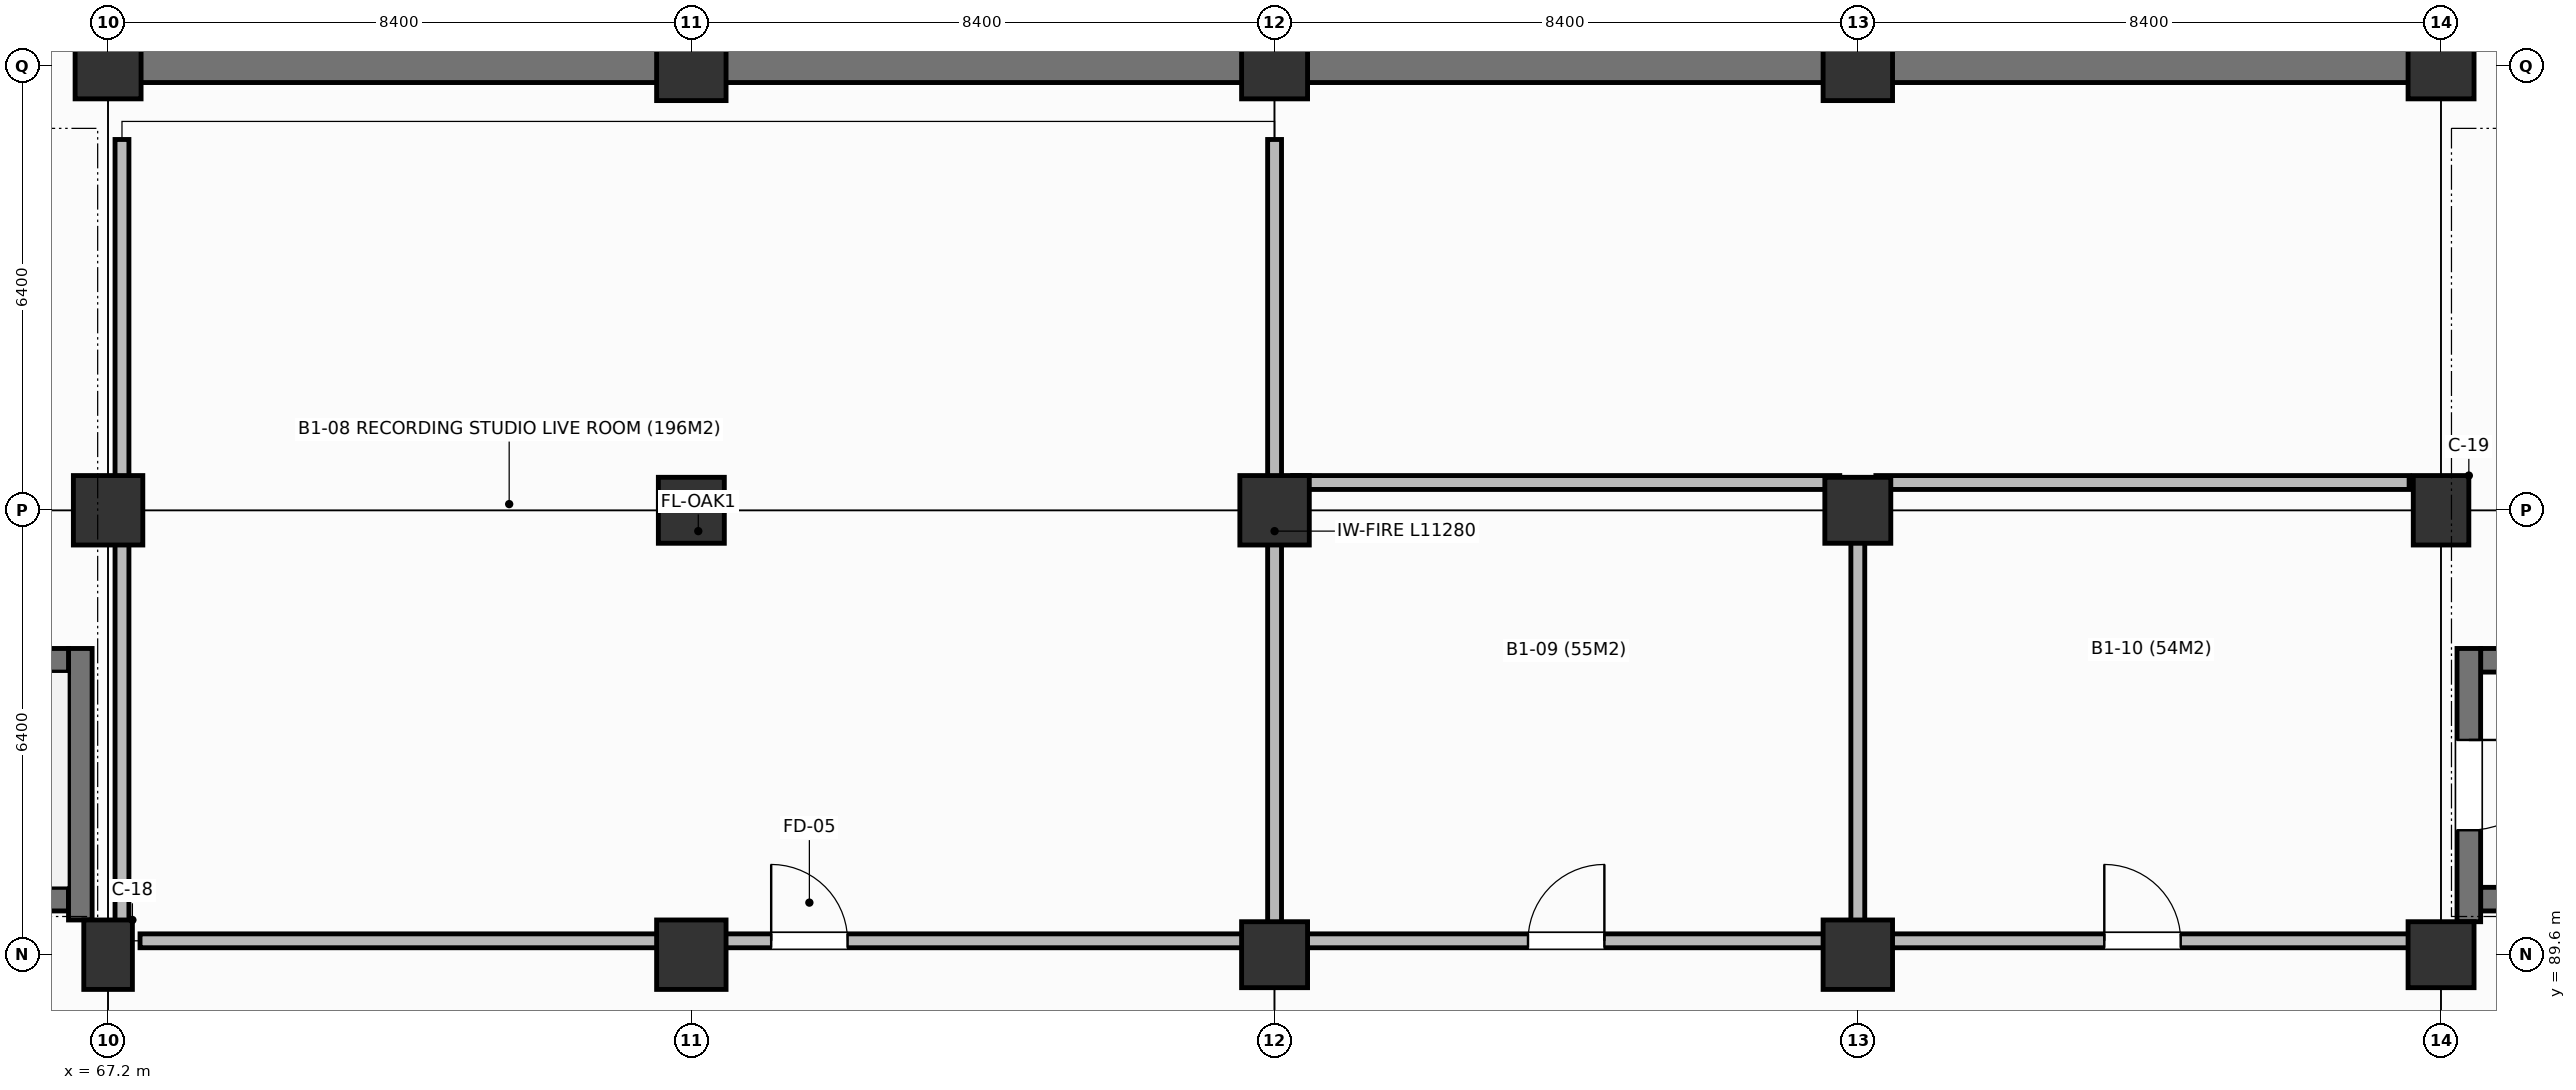
"""IFC4 building model, lengths in metres.
Left out: names, types, materials, properties, quantities, classifications, styles, units other than length and angle.
Written with IfcOpenShell. Run it as: python <this file> out.ifc"""

import sys

from ifc_helpers import new_model, si_unit, direction, frame, frame_2d, origin, origin_2d, place, context, subcontext, project, spatial, rectangle, extrude, element, fill, save


model = new_model("IFC4")
c1 = context("Model", 3, precision=1e-05, world=origin(), true_north=direction((0.0, 1.0)))
c2 = subcontext(c1, "Body", "Model", "MODEL_VIEW")
j1 = project(units=[si_unit("LENGTHUNIT", "METRE"), si_unit("PLANEANGLEUNIT", "RADIAN")], contexts=[c1])
p1 = place(None, origin())
s1 = spatial("IfcSite", under=j1, at=p1, CompositionType="ELEMENT")
p2 = place(p1, origin())
s2 = spatial("IfcBuilding", under=s1, at=p2, CompositionType="ELEMENT")
p3 = place(p2, frame((0.0, 0.0, -4.8)))
s3 = spatial("IfcBuildingStorey", under=s2, at=p3, CompositionType="ELEMENT", Elevation=-4.8)
p4 = place(p3, frame((67.2, 89.6, 0.0), z_axis=(0.0, 0.0, 1.0), x_axis=(1.0, 0.0, 0.0)))
e1 = element("IfcColumn", 1, at=p4, inside=s3, PredefinedType="COLUMN", context=c2, shape_type="SweptSolid", body=[
    extrude(rectangle(XDim=0.7, YDim=1.0, at=origin_2d()), origin(), (0.0, 0.0, 1.0), 4.8),
])
p5 = place(p3, frame((67.2, 96.0, 0.0), z_axis=(0.0, 0.0, 1.0), x_axis=(1.0, 0.0, 0.0)))
e2 = element("IfcColumn", 2, at=p5, inside=s3, PredefinedType="COLUMN", context=c2, shape_type="SweptSolid", body=[
    extrude(rectangle(XDim=1.0, YDim=1.0, at=origin_2d()), origin(), (0.0, 0.0, 1.0), 4.8),
])
p6 = place(p3, frame((67.2, 102.4, 0.0), z_axis=(0.0, 0.0, 1.0), x_axis=(1.0, 0.0, 0.0)))
e3 = element("IfcColumn", 3, at=p6, inside=s3, PredefinedType="COLUMN", context=c2, shape_type="SweptSolid", body=[
    extrude(rectangle(XDim=0.95, YDim=0.95, at=origin_2d()), origin(), (0.0, 0.0, 1.0), 4.8),
])
p7 = place(p3, frame((75.6, 89.6, 0.0), z_axis=(0.0, 0.0, 1.0), x_axis=(1.0, 0.0, 0.0)))
e4 = element("IfcColumn", 4, at=p7, inside=s3, PredefinedType="COLUMN", context=c2, shape_type="SweptSolid", body=[
    extrude(rectangle(XDim=1.0, YDim=1.0, at=origin_2d()), origin(), (0.0, 0.0, 1.0), 4.8),
])
p8 = place(p3, frame((75.6, 96.0, 0.0), z_axis=(0.0, 0.0, 1.0), x_axis=(1.0, 0.0, 0.0)))
e5 = element("IfcColumn", 5, at=p8, inside=s3, PredefinedType="COLUMN", context=c2, shape_type="SweptSolid", body=[
    extrude(rectangle(XDim=0.95, YDim=0.95, at=origin_2d()), origin(), (0.0, 0.0, 1.0), 4.8),
])
p9 = place(p3, frame((75.6, 102.4, 0.0), z_axis=(0.0, 0.0, 1.0), x_axis=(1.0, 0.0, 0.0)))
e6 = element("IfcColumn", 6, at=p9, inside=s3, PredefinedType="COLUMN", context=c2, shape_type="SweptSolid", body=[
    extrude(rectangle(XDim=1.0, YDim=1.0, at=origin_2d()), origin(), (0.0, 0.0, 1.0), 4.8),
])
p10 = place(p3, frame((84.0, 89.6, 0.0), z_axis=(0.0, 0.0, 1.0), x_axis=(1.0, 0.0, 0.0)))
e7 = element("IfcColumn", 7, at=p10, inside=s3, PredefinedType="COLUMN", context=c2, shape_type="SweptSolid", body=[
    extrude(rectangle(XDim=0.95, YDim=0.95, at=origin_2d()), origin(), (0.0, 0.0, 1.0), 4.8),
])
p11 = place(p3, frame((84.0, 96.0, 0.0), z_axis=(0.0, 0.0, 1.0), x_axis=(1.0, 0.0, 0.0)))
e8 = element("IfcColumn", 8, at=p11, inside=s3, PredefinedType="COLUMN", context=c2, shape_type="SweptSolid", body=[
    extrude(rectangle(XDim=1.0, YDim=1.0, at=origin_2d()), origin(), (0.0, 0.0, 1.0), 4.8),
])
p12 = place(p3, frame((84.0, 102.4, 0.0), z_axis=(0.0, 0.0, 1.0), x_axis=(1.0, 0.0, 0.0)))
e9 = element("IfcColumn", 9, at=p12, inside=s3, PredefinedType="COLUMN", context=c2, shape_type="SweptSolid", body=[
    extrude(rectangle(XDim=0.95, YDim=0.95, at=origin_2d()), origin(), (0.0, 0.0, 1.0), 4.8),
])
p13 = place(p3, frame((92.4, 89.6, 0.0), z_axis=(0.0, 0.0, 1.0), x_axis=(1.0, 0.0, 0.0)))
e10 = element("IfcColumn", 10, at=p13, inside=s3, PredefinedType="COLUMN", context=c2, shape_type="SweptSolid", body=[
    extrude(rectangle(XDim=1.0, YDim=1.0, at=origin_2d()), origin(), (0.0, 0.0, 1.0), 4.8),
])
p14 = place(p3, frame((92.4, 96.0, 0.0), z_axis=(0.0, 0.0, 1.0), x_axis=(1.0, 0.0, 0.0)))
e11 = element("IfcColumn", 11, at=p14, inside=s3, PredefinedType="COLUMN", context=c2, shape_type="SweptSolid", body=[
    extrude(rectangle(XDim=0.95, YDim=0.95, at=origin_2d()), origin(), (0.0, 0.0, 1.0), 4.8),
])
p15 = place(p3, frame((92.4, 102.4, 0.0), z_axis=(0.0, 0.0, 1.0), x_axis=(1.0, 0.0, 0.0)))
e12 = element("IfcColumn", 12, at=p15, inside=s3, PredefinedType="COLUMN", context=c2, shape_type="SweptSolid", body=[
    extrude(rectangle(XDim=1.0, YDim=1.0, at=origin_2d()), origin(), (0.0, 0.0, 1.0), 4.8),
])
p16 = place(p3, frame((100.8, 89.6, 0.0), z_axis=(0.0, 0.0, 1.0), x_axis=(1.0, 0.0, 0.0)))
e13 = element("IfcColumn", 13, at=p16, inside=s3, PredefinedType="COLUMN", context=c2, shape_type="SweptSolid", body=[
    extrude(rectangle(XDim=0.95, YDim=0.95, at=origin_2d()), origin(), (0.0, 0.0, 1.0), 4.8),
])
p17 = place(p3, frame((100.8, 96.0, 0.0), z_axis=(0.0, 0.0, 1.0), x_axis=(1.0, 0.0, 0.0)))
e14 = element("IfcColumn", 14, at=p17, inside=s3, PredefinedType="COLUMN", context=c2, shape_type="SweptSolid", body=[
    extrude(rectangle(XDim=0.8, YDim=1.0, at=origin_2d()), origin(), (0.0, 0.0, 1.0), 4.8),
])
p18 = place(p3, frame((100.8, 102.4, 0.0), z_axis=(0.0, 0.0, 1.0), x_axis=(1.0, 0.0, 0.0)))
e15 = element("IfcColumn", 15, at=p18, inside=s3, PredefinedType="COLUMN", context=c2, shape_type="SweptSolid", body=[
    extrude(rectangle(XDim=0.95, YDim=0.95, at=origin_2d()), origin(), (0.0, 0.0, 1.0), 4.8),
])
p19 = place(p3, frame((67.2, 108.8, 0.0), z_axis=(0.0, 0.0, 1.0), x_axis=(0.0, -1.0, 0.0)))
e16 = element("IfcWall", 16, at=p19, inside=s3, PredefinedType="SOLIDWALL", context=c2, shape_type="SweptSolid", body=[
    extrude(rectangle(XDim=6.4, YDim=0.48, at=frame_2d((3.2, 0.0))), origin(), (0.0, 0.0, 1.0), 4.25),
])
p20 = place(p3, frame((67.2, 102.4, 0.0), z_axis=(0.0, 0.0, 1.0), x_axis=(1.0, 0.0, 0.0)))
e17 = element("IfcWall", 17, at=p20, inside=s3, PredefinedType="SOLIDWALL", context=c2, shape_type="SweptSolid", body=[
    extrude(rectangle(XDim=8.4, YDim=0.48, at=frame_2d((4.2, 0.0))), origin(), (0.0, 0.0, 1.0), 4.25),
])
for number, where, z_axis, x_axis in (
    (18, (75.6, 102.4, 0.0), (0.0, 0.0, 1.0), (1.0, 0.0, 0.0)),
    (19, (84.0, 102.4, 0.0), (0.0, 0.0, 1.0), (1.0, 0.0, 0.0)),
):
    element("IfcWall", number, at=place(p3, frame(where, z_axis=z_axis, x_axis=x_axis)), inside=s3, PredefinedType="SOLIDWALL", context=c2, shape_type="SweptSolid", body=[
        extrude(rectangle(XDim=8.4, YDim=0.48, at=frame_2d((4.2, 0.0))), origin(), (0.0, 0.0, 1.0), 4.25),
    ])
p21 = place(p3, frame((92.4, 102.4, 0.0), z_axis=(0.0, 0.0, 1.0), x_axis=(1.0, 0.0, 0.0)))
e20 = element("IfcWall", 20, at=p21, inside=s3, PredefinedType="SOLIDWALL", context=c2, shape_type="SweptSolid", body=[
    extrude(rectangle(XDim=8.4, YDim=0.48, at=frame_2d((4.2, 0.0))), origin(), (0.0, 0.0, 1.0), 4.25),
])
p22 = place(p3, frame((100.8, 102.4, 0.0), z_axis=(0.0, 0.0, 1.0), x_axis=(0.0, 1.0, 0.0)))
e21 = element("IfcWall", 21, at=p22, inside=s3, PredefinedType="SOLIDWALL", context=c2, shape_type="SweptSolid", body=[
    extrude(rectangle(XDim=6.4, YDim=0.48, at=frame_2d((3.2, 0.0))), origin(), (0.0, 0.0, 1.0), 4.25),
])
p23 = place(p3, frame((59.37, 90.4, 0.0), z_axis=(0.0, 0.0, 1.0), x_axis=(1.0, 0.0, 0.0)))
e22 = element("IfcWall", 22, at=p23, inside=s3, PredefinedType="SHEAR", context=c2, shape_type="SweptSolid", body=[
    extrude(rectangle(XDim=7.26, YDim=0.34, at=frame_2d((3.63, 0.0))), origin(), (0.0, 0.0, 1.0), 4.8),
])
p24 = place(p3, frame((66.8, 90.1, 0.0), z_axis=(0.0, 0.0, 1.0), x_axis=(0.0, 1.0, 0.0)))
e23 = element("IfcWall", 23, at=p24, inside=s3, PredefinedType="SHEAR", context=c2, shape_type="SweptSolid", body=[
    extrude(rectangle(XDim=3.91, YDim=0.34, at=frame_2d((1.955, 0.0))), origin(), (0.0, 0.0, 1.0), 4.8),
])
for number, where, z_axis, x_axis in (
    (24, (66.63, 93.84, 0.0), (0.0, 0.0, 1.0), (-1.0, 0.0, 0.0)),
    (25, (101.37, 90.4, 0.0), (0.0, 0.0, 1.0), (1.0, 0.0, 0.0)),
    (26, (108.63, 93.84, 0.0), (0.0, 0.0, 1.0), (-1.0, 0.0, 0.0)),
):
    element("IfcWall", number, at=place(p3, frame(where, z_axis=z_axis, x_axis=x_axis)), inside=s3, PredefinedType="SHEAR", context=c2, shape_type="SweptSolid", body=[
        extrude(rectangle(XDim=7.26, YDim=0.34, at=frame_2d((3.63, 0.0))), origin(), (0.0, 0.0, 1.0), 4.8),
    ])
p25 = place(p3, frame((101.2, 94.01, 0.0), z_axis=(0.0, 0.0, 1.0), x_axis=(0.0, -1.0, 0.0)))
e27 = element("IfcWall", 27, at=p25, inside=s3, PredefinedType="SHEAR", context=c2, shape_type="SweptSolid", body=[
    extrude(rectangle(XDim=3.935, YDim=0.34, at=frame_2d((1.968, 0.0))), origin(), (0.0, 0.0, 1.0), 4.8),
])
p26 = place(p25, frame((1.317, 0.0, 0.0)))
e28 = element("IfcOpeningElement", 28, at=p26, cuts=e27, PredefinedType="OPENING", context=c2, shape_type="SweptSolid", body=[
    extrude(rectangle(XDim=1.3, YDim=2.15, at=frame_2d((0.65, 1.075))), frame((0.0, 0.18, 0.0), z_axis=(0.0, -1.0, 0.0), x_axis=(1.0, 0.0, 0.0)), (0.0, 0.0, 1.0), 0.36),
])
p27 = place(p3, frame((67.66, 89.8, 0.0), z_axis=(0.0, 0.0, 1.0), x_axis=(1.0, 0.0, 0.0)))
e29 = element("IfcWall", 29, at=p27, inside=s3, PredefinedType="PARTITIONING", context=c2, shape_type="SweptSolid", body=[
    extrude(rectangle(XDim=16.08, YDim=0.2, at=frame_2d((8.04, 0.0))), origin(), (0.0, 0.0, 1.0), 3.475),
])
p28 = place(p27, frame((9.09, 0.0, 0.0)))
e30 = element("IfcOpeningElement", 30, at=p28, cuts=e29, PredefinedType="OPENING", context=c2, shape_type="SweptSolid", body=[
    extrude(rectangle(XDim=1.1, YDim=2.15, at=frame_2d((0.55, 1.075))), frame((0.0, 0.11, 0.0), z_axis=(0.0, -1.0, 0.0), x_axis=(1.0, 0.0, 0.0)), (0.0, 0.0, 1.0), 0.22),
])
p29 = place(p3, frame((84.0, 90.06, 0.0), z_axis=(0.0, 0.0, 1.0), x_axis=(0.0, 1.0, 0.0)))
e31 = element("IfcWall", 31, at=p29, inside=s3, PredefinedType="PARTITIONING", context=c2, shape_type="SweptSolid", body=[
    extrude(rectangle(XDim=11.28, YDim=0.2, at=frame_2d((5.64, 0.0))), origin(), (0.0, 0.0, 1.0), 3.375),
])
p30 = place(p3, frame((67.4, 101.34, 0.0), z_axis=(0.0, 0.0, 1.0), x_axis=(0.0, -1.0, 0.0)))
e32 = element("IfcWall", 32, at=p30, inside=s3, PredefinedType="PARTITIONING", context=c2, shape_type="SweptSolid", body=[
    extrude(rectangle(XDim=11.28, YDim=0.2, at=frame_2d((5.64, 0.0))), origin(), (0.0, 0.0, 1.0), 3.025),
])
p31 = place(p3, frame((84.26, 89.8, 0.0), z_axis=(0.0, 0.0, 1.0), x_axis=(1.0, 0.0, 0.0)))
e33 = element("IfcWall", 33, at=p31, inside=s3, PredefinedType="PARTITIONING", context=c2, shape_type="SweptSolid", body=[
    extrude(rectangle(XDim=7.88, YDim=0.2, at=frame_2d((3.94, 0.0))), origin(), (0.0, 0.0, 1.0), 3.475),
])
p32 = place(p31, frame((3.39, 0.0, 0.0)))
e34 = element("IfcOpeningElement", 34, at=p32, cuts=e33, PredefinedType="OPENING", context=c2, shape_type="SweptSolid", body=[
    extrude(rectangle(XDim=1.1, YDim=2.15, at=frame_2d((0.55, 1.075))), frame((0.0, 0.11, 0.0), z_axis=(0.0, -1.0, 0.0), x_axis=(1.0, 0.0, 0.0)), (0.0, 0.0, 1.0), 0.22),
])
p33 = place(p3, frame((92.4, 90.06, 0.0), z_axis=(0.0, 0.0, 1.0), x_axis=(0.0, 1.0, 0.0)))
e35 = element("IfcWall", 35, at=p33, inside=s3, PredefinedType="PARTITIONING", context=c2, shape_type="SweptSolid", body=[
    extrude(rectangle(XDim=6.08, YDim=0.2, at=frame_2d((3.04, 0.0))), origin(), (0.0, 0.0, 1.0), 3.375),
])
p34 = place(p3, frame((92.14, 96.4, 0.0), z_axis=(0.0, 0.0, 1.0), x_axis=(-1.0, 0.0, 0.0)))
e36 = element("IfcWall", 36, at=p34, inside=s3, PredefinedType="PARTITIONING", context=c2, shape_type="SweptSolid", body=[
    extrude(rectangle(XDim=7.88, YDim=0.2, at=frame_2d((3.94, 0.0))), origin(), (0.0, 0.0, 1.0), 3.425),
])
p35 = place(p3, frame((92.66, 89.8, 0.0), z_axis=(0.0, 0.0, 1.0), x_axis=(1.0, 0.0, 0.0)))
e37 = element("IfcWall", 37, at=p35, inside=s3, PredefinedType="PARTITIONING", context=c2, shape_type="SweptSolid", body=[
    extrude(rectangle(XDim=7.68, YDim=0.2, at=frame_2d((3.84, 0.0))), origin(), (0.0, 0.0, 1.0), 3.425),
])
p36 = place(p35, frame((3.29, 0.0, 0.0)))
e38 = element("IfcOpeningElement", 38, at=p36, cuts=e37, PredefinedType="OPENING", context=c2, shape_type="SweptSolid", body=[
    extrude(rectangle(XDim=1.1, YDim=2.15, at=frame_2d((0.55, 1.075))), frame((0.0, 0.11, 0.0), z_axis=(0.0, -1.0, 0.0), x_axis=(1.0, 0.0, 0.0)), (0.0, 0.0, 1.0), 0.22),
])
p37 = place(p3, frame((100.34, 96.4, 0.0), z_axis=(0.0, 0.0, 1.0), x_axis=(-1.0, 0.0, 0.0)))
e39 = element("IfcWall", 39, at=p37, inside=s3, PredefinedType="PARTITIONING", context=c2, shape_type="SweptSolid", body=[
    extrude(rectangle(XDim=7.68, YDim=0.2, at=frame_2d((3.84, 0.0))), origin(), (0.0, 0.0, 1.0), 3.425),
])
p38 = place(p26, origin())
e40 = element("IfcDoor", 40, at=p38, inside=s3, OperationType="SINGLE_SWING_LEFT", PredefinedType="DOOR", context=c2, shape_type="SweptSolid", body=[
    extrude(rectangle(XDim=1.3, YDim=2.15, at=frame_2d((0.65, 1.075))), frame((0.0, 0.025, 0.0), z_axis=(0.0, -1.0, 0.0), x_axis=(1.0, 0.0, 0.0)), (0.0, 0.0, 1.0), 0.05),
])
fill(e28, e40)
p39 = place(p28, origin())
e41 = element("IfcDoor", 41, at=p39, inside=s3, OperationType="SINGLE_SWING_LEFT", PredefinedType="DOOR", context=c2, shape_type="SweptSolid", body=[
    extrude(rectangle(XDim=1.1, YDim=2.15, at=frame_2d((0.55, 1.075))), frame((0.0, 0.025, 0.0), z_axis=(0.0, -1.0, 0.0), x_axis=(1.0, 0.0, 0.0)), (0.0, 0.0, 1.0), 0.05),
])
fill(e30, e41)
p40 = place(p32, origin())
e42 = element("IfcDoor", 42, at=p40, inside=s3, OperationType="SINGLE_SWING_RIGHT", PredefinedType="DOOR", context=c2, shape_type="SweptSolid", body=[
    extrude(rectangle(XDim=1.1, YDim=2.15, at=frame_2d((0.55, 1.075))), frame((0.0, 0.025, 0.0), z_axis=(0.0, -1.0, 0.0), x_axis=(1.0, 0.0, 0.0)), (0.0, 0.0, 1.0), 0.05),
])
fill(e34, e42)
p41 = place(p36, origin())
e43 = element("IfcDoor", 43, at=p41, inside=s3, OperationType="SINGLE_SWING_LEFT", PredefinedType="DOOR", context=c2, shape_type="SweptSolid", body=[
    extrude(rectangle(XDim=1.1, YDim=2.15, at=frame_2d((0.55, 1.075))), frame((0.0, 0.025, 0.0), z_axis=(0.0, -1.0, 0.0), x_axis=(1.0, 0.0, 0.0)), (0.0, 0.0, 1.0), 0.05),
])
fill(e38, e43)
save(model, sys.argv[1])
